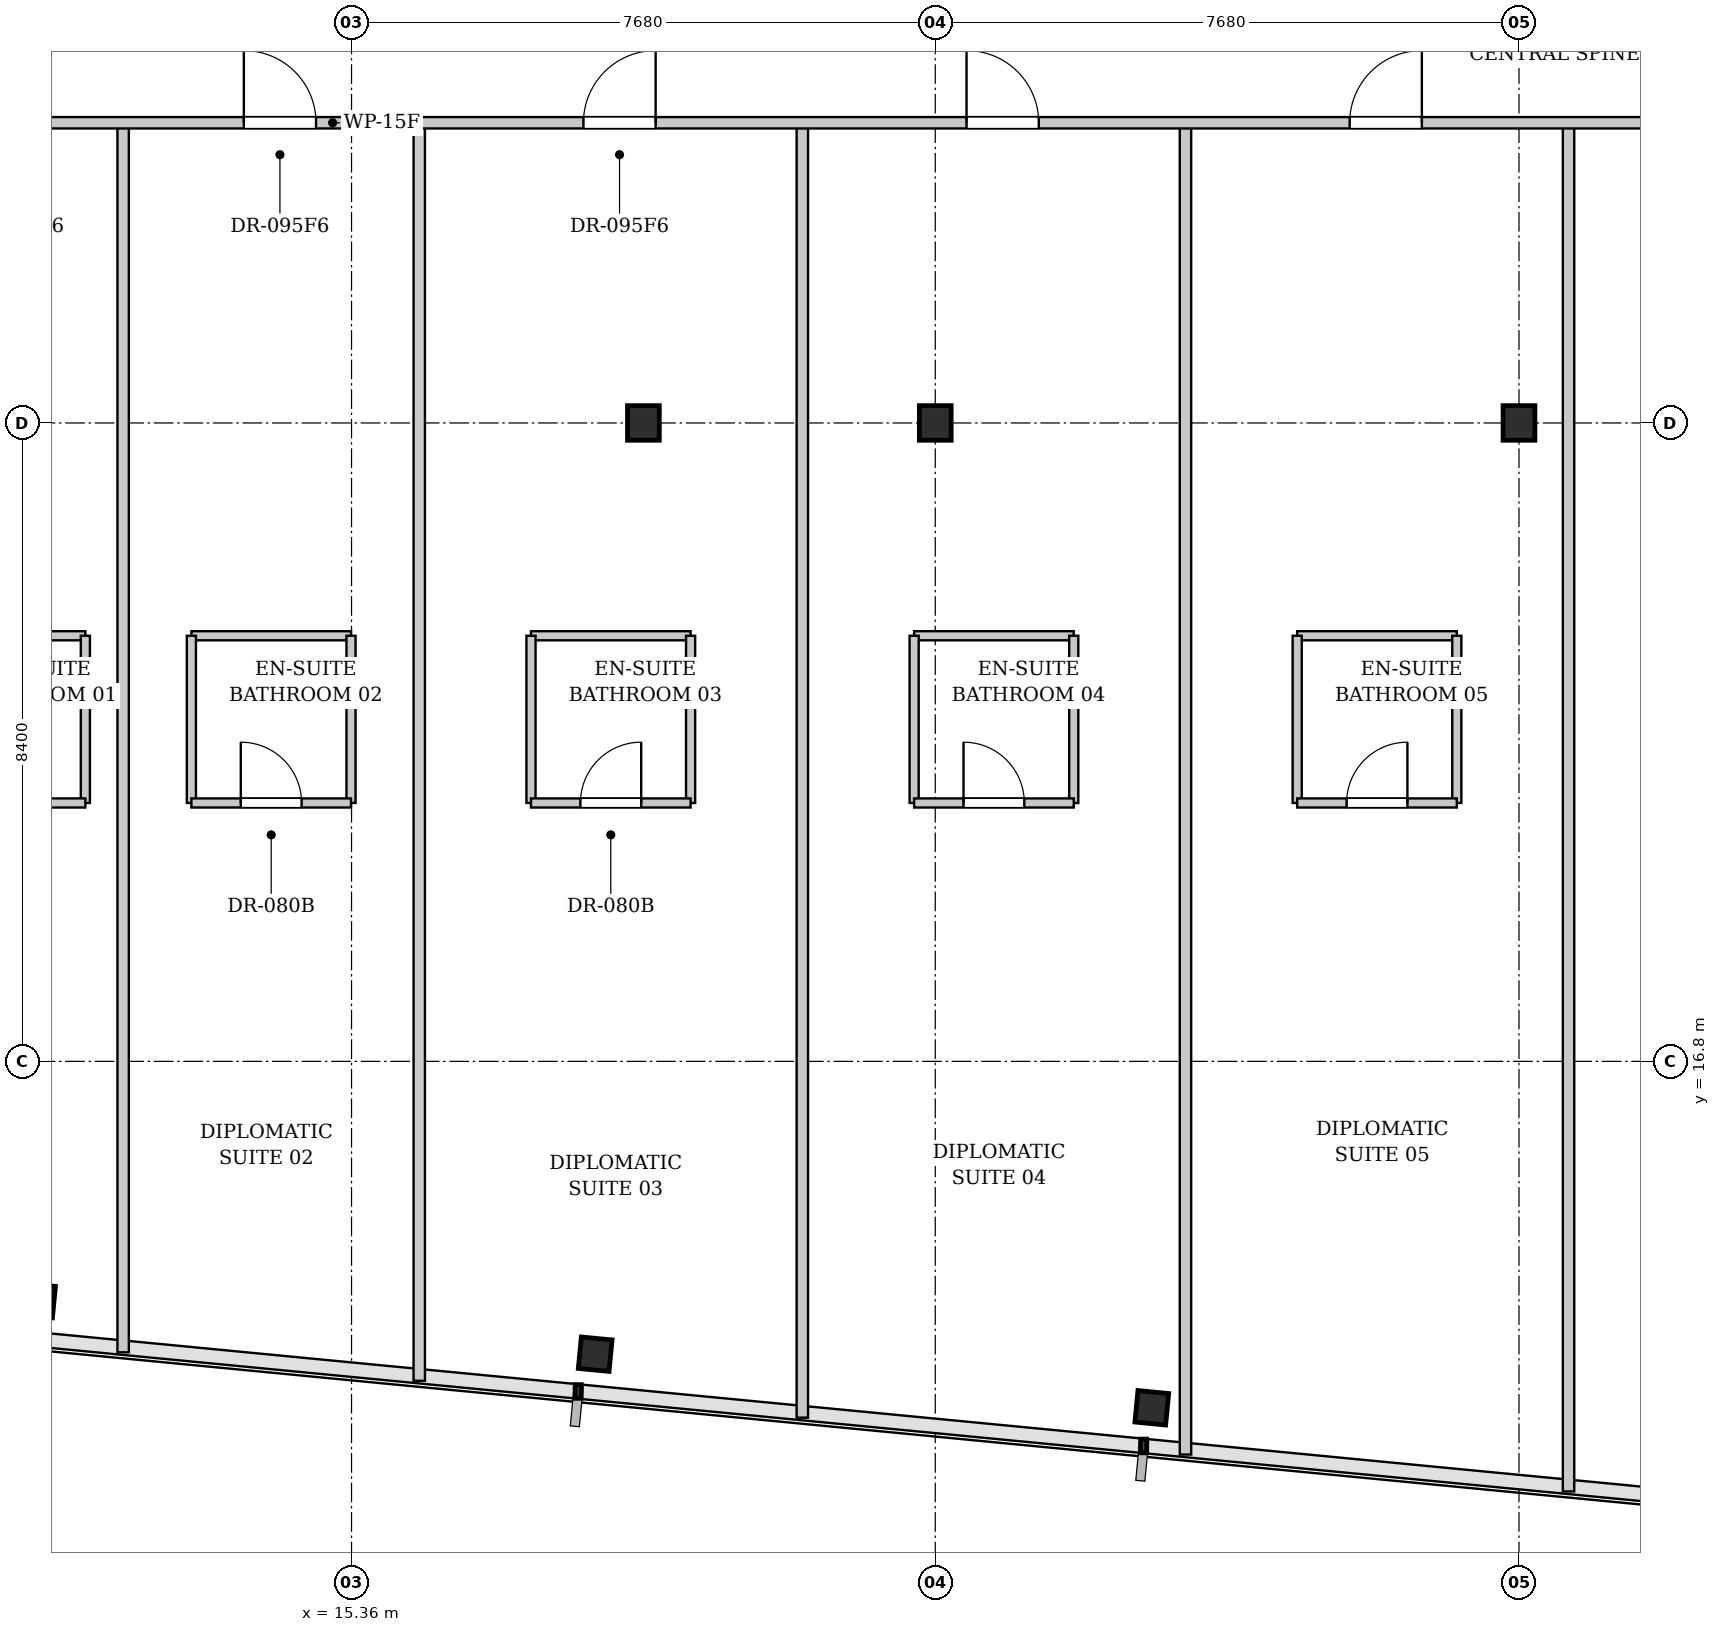
"""IFC4 building model, lengths in metres.
Left out: names, types, materials, properties, quantities, classifications, styles, units other than length and angle.
Written with IfcOpenShell. Run it as: python <this file> out.ifc"""

import sys

from ifc_helpers import new_model, si_unit, direction, frame, frame_2d, origin, origin_2d, place, context, subcontext, project, spatial, rectangle, i_section, extrude, element, fill, save


model = new_model("IFC4")
c1 = context("Model", 3, precision=1e-05, world=origin(), true_north=direction((0.0, 1.0)))
c2 = subcontext(c1, "Body", "Model", "MODEL_VIEW")
j1 = project(units=[si_unit("LENGTHUNIT", "METRE"), si_unit("PLANEANGLEUNIT", "RADIAN")], contexts=[c1])
p1 = place(None, origin())
s1 = spatial("IfcSite", under=j1, at=p1, CompositionType="ELEMENT")
p2 = place(p1, origin())
s2 = spatial("IfcBuilding", under=s1, at=p2, CompositionType="ELEMENT")
p3 = place(p2, frame((0.0, 0.0, 178.7)))
s3 = spatial("IfcBuildingStorey", under=s2, at=p3, CompositionType="ELEMENT", Elevation=178.7)
for number, where, z_axis, x_axis in (
    (1, (23.04, 25.2, 0.0), (0.0, 0.0, 1.0), (1.0, 0.0, 0.0)),
    (2, (30.72, 25.2, 0.0), (0.0, 0.0, 1.0), (1.0, 0.0, 0.0)),
    (3, (19.2, 25.2, 0.0), (0.0, 0.0, 1.0), (1.0, 0.0, 0.0)),
):
    element("IfcColumn", number, at=place(p3, frame(where, z_axis=z_axis, x_axis=x_axis)), inside=s3, PredefinedType="COLUMN", context=c2, shape_type="SweptSolid", body=[
        extrude(i_section(OverallWidth=0.418, OverallDepth=0.455, WebThickness=0.042, FlangeThickness=0.068, FilletRadius=0.015, at=origin_2d()), origin(), (0.0, 0.0, 1.0), 3.3),
    ])
for number, where, z_axis, x_axis in (
    (4, (11.242, 13.652, 0.0), (0.0, 0.0, 1.0), (0.995, -0.096, 0.0)),
    (5, (18.566, 12.947, 0.0), (0.0, 0.0, 1.0), (0.995, -0.096, 0.0)),
    (6, (25.889, 12.242, 0.0), (0.0, 0.0, 1.0), (0.995, -0.096, 0.0)),
):
    element("IfcColumn", number, at=place(p3, frame(where, z_axis=z_axis, x_axis=x_axis)), inside=s3, PredefinedType="COLUMN", context=c2, shape_type="SweptSolid", body=[
        extrude(i_section(OverallWidth=0.406, OverallDepth=0.416, WebThickness=0.03, FlangeThickness=0.048, FilletRadius=0.015, at=origin_2d()), origin(), (0.0, 0.0, 1.0), 3.3),
    ])
p4 = place(p3, frame((9.758, 22.4, 0.0), z_axis=(0.0, 0.0, 1.0), x_axis=(1.0, 0.0, 0.0)))
e7 = element("IfcWall", 7, at=p4, inside=s3, PredefinedType="PARTITIONING", context=c2, shape_type="SweptSolid", body=[
    extrude(rectangle(XDim=2.1, YDim=0.12, at=frame_2d((1.05, 0.0))), origin(), (0.0, 0.0, 1.0), 3.08),
])
p5 = place(p3, frame((11.858, 20.2, 0.0), z_axis=(0.0, 0.0, 1.0), x_axis=(0.0, 1.0, 0.0)))
e8 = element("IfcWall", 8, at=p5, inside=s3, PredefinedType="PARTITIONING", context=c2, shape_type="SweptSolid", body=[
    extrude(rectangle(XDim=2.2, YDim=0.12, at=frame_2d((1.1, 0.0))), origin(), (0.0, 0.0, 1.0), 3.08),
])
p6 = place(p3, frame((9.758, 20.2, 0.0), z_axis=(0.0, 0.0, 1.0), x_axis=(1.0, 0.0, 0.0)))
e9 = element("IfcWall", 9, at=p6, inside=s3, PredefinedType="PARTITIONING", context=c2, shape_type="SweptSolid", body=[
    extrude(rectangle(XDim=2.1, YDim=0.12, at=frame_2d((1.05, 0.0))), origin(), (0.0, 0.0, 1.0), 3.08),
])
p7 = place(p6, frame((0.65, 0.0, 0.0)))
e10 = element("IfcOpeningElement", 10, at=p7, cuts=e9, PredefinedType="OPENING", context=c2, shape_type="SweptSolid", body=[
    extrude(rectangle(XDim=0.8, YDim=2.1, at=frame_2d((0.4, 1.05))), frame((0.0, 0.07, 0.0), z_axis=(0.0, -1.0, 0.0), x_axis=(1.0, 0.0, 0.0)), (0.0, 0.0, 1.0), 0.14),
])
p8 = place(p3, frame((13.253, 22.4, 0.0), z_axis=(0.0, 0.0, 1.0), x_axis=(1.0, 0.0, 0.0)))
e11 = element("IfcWall", 11, at=p8, inside=s3, PredefinedType="PARTITIONING", context=c2, shape_type="SweptSolid", body=[
    extrude(rectangle(XDim=2.1, YDim=0.12, at=frame_2d((1.05, 0.0))), origin(), (0.0, 0.0, 1.0), 3.08),
])
for number, where, z_axis, x_axis in (
    (12, (13.253, 20.2, 0.0), (0.0, 0.0, 1.0), (0.0, 1.0, 0.0)),
    (13, (15.353, 20.2, 0.0), (0.0, 0.0, 1.0), (0.0, 1.0, 0.0)),
):
    element("IfcWall", number, at=place(p3, frame(where, z_axis=z_axis, x_axis=x_axis)), inside=s3, PredefinedType="PARTITIONING", context=c2, shape_type="SweptSolid", body=[
        extrude(rectangle(XDim=2.2, YDim=0.12, at=frame_2d((1.1, 0.0))), origin(), (0.0, 0.0, 1.0), 3.08),
    ])
p9 = place(p3, frame((13.253, 20.2, 0.0), z_axis=(0.0, 0.0, 1.0), x_axis=(1.0, 0.0, 0.0)))
e14 = element("IfcWall", 14, at=p9, inside=s3, PredefinedType="PARTITIONING", context=c2, shape_type="SweptSolid", body=[
    extrude(rectangle(XDim=2.1, YDim=0.12, at=frame_2d((1.05, 0.0))), origin(), (0.0, 0.0, 1.0), 3.08),
])
p10 = place(p9, frame((0.65, 0.0, 0.0)))
e15 = element("IfcOpeningElement", 15, at=p10, cuts=e14, PredefinedType="OPENING", context=c2, shape_type="SweptSolid", body=[
    extrude(rectangle(XDim=0.8, YDim=2.1, at=frame_2d((0.4, 1.05))), frame((0.0, 0.07, 0.0), z_axis=(0.0, -1.0, 0.0), x_axis=(1.0, 0.0, 0.0)), (0.0, 0.0, 1.0), 0.14),
])
p11 = place(p3, frame((12.355, 12.972, 0.0), z_axis=(0.0, 0.0, 1.0), x_axis=(0.0, 1.0, 0.0)))
e16 = element("IfcWall", 16, at=p11, inside=s3, PredefinedType="PARTITIONING", context=c2, shape_type="SweptSolid", body=[
    extrude(rectangle(XDim=16.198, YDim=0.15, at=frame_2d((8.099, 0.0))), origin(), (0.0, 0.0, 1.0), 3.08),
])
p12 = place(p3, frame((17.721, 22.4, 0.0), z_axis=(0.0, 0.0, 1.0), x_axis=(1.0, 0.0, 0.0)))
e17 = element("IfcWall", 17, at=p12, inside=s3, PredefinedType="PARTITIONING", context=c2, shape_type="SweptSolid", body=[
    extrude(rectangle(XDim=2.1, YDim=0.12, at=frame_2d((1.05, 0.0))), origin(), (0.0, 0.0, 1.0), 3.08),
])
for number, where, z_axis, x_axis in (
    (18, (17.721, 20.2, 0.0), (0.0, 0.0, 1.0), (0.0, 1.0, 0.0)),
    (19, (19.821, 20.2, 0.0), (0.0, 0.0, 1.0), (0.0, 1.0, 0.0)),
):
    element("IfcWall", number, at=place(p3, frame(where, z_axis=z_axis, x_axis=x_axis)), inside=s3, PredefinedType="PARTITIONING", context=c2, shape_type="SweptSolid", body=[
        extrude(rectangle(XDim=2.2, YDim=0.12, at=frame_2d((1.1, 0.0))), origin(), (0.0, 0.0, 1.0), 3.08),
    ])
p13 = place(p3, frame((17.721, 20.2, 0.0), z_axis=(0.0, 0.0, 1.0), x_axis=(1.0, 0.0, 0.0)))
e20 = element("IfcWall", 20, at=p13, inside=s3, PredefinedType="PARTITIONING", context=c2, shape_type="SweptSolid", body=[
    extrude(rectangle(XDim=2.1, YDim=0.12, at=frame_2d((1.05, 0.0))), origin(), (0.0, 0.0, 1.0), 3.08),
])
p14 = place(p13, frame((0.65, 0.0, 0.0)))
e21 = element("IfcOpeningElement", 21, at=p14, cuts=e20, PredefinedType="OPENING", context=c2, shape_type="SweptSolid", body=[
    extrude(rectangle(XDim=0.8, YDim=2.1, at=frame_2d((0.4, 1.05))), frame((0.0, 0.07, 0.0), z_axis=(0.0, -1.0, 0.0), x_axis=(1.0, 0.0, 0.0)), (0.0, 0.0, 1.0), 0.14),
])
p15 = place(p3, frame((16.251, 12.597, 0.0), z_axis=(0.0, 0.0, 1.0), x_axis=(0.0, 1.0, 0.0)))
e22 = element("IfcWall", 22, at=p15, inside=s3, PredefinedType="PARTITIONING", context=c2, shape_type="SweptSolid", body=[
    extrude(rectangle(XDim=16.573, YDim=0.15, at=frame_2d((8.286, 0.0))), origin(), (0.0, 0.0, 1.0), 3.08),
])
p16 = place(p3, frame((22.762, 22.4, 0.0), z_axis=(0.0, 0.0, 1.0), x_axis=(1.0, 0.0, 0.0)))
e23 = element("IfcWall", 23, at=p16, inside=s3, PredefinedType="PARTITIONING", context=c2, shape_type="SweptSolid", body=[
    extrude(rectangle(XDim=2.1, YDim=0.12, at=frame_2d((1.05, 0.0))), origin(), (0.0, 0.0, 1.0), 3.08),
])
for number, where, z_axis, x_axis in (
    (24, (22.762, 20.2, 0.0), (0.0, 0.0, 1.0), (0.0, 1.0, 0.0)),
    (25, (24.862, 20.2, 0.0), (0.0, 0.0, 1.0), (0.0, 1.0, 0.0)),
):
    element("IfcWall", number, at=place(p3, frame(where, z_axis=z_axis, x_axis=x_axis)), inside=s3, PredefinedType="PARTITIONING", context=c2, shape_type="SweptSolid", body=[
        extrude(rectangle(XDim=2.2, YDim=0.12, at=frame_2d((1.1, 0.0))), origin(), (0.0, 0.0, 1.0), 3.08),
    ])
p17 = place(p3, frame((22.762, 20.2, 0.0), z_axis=(0.0, 0.0, 1.0), x_axis=(1.0, 0.0, 0.0)))
e26 = element("IfcWall", 26, at=p17, inside=s3, PredefinedType="PARTITIONING", context=c2, shape_type="SweptSolid", body=[
    extrude(rectangle(XDim=2.1, YDim=0.12, at=frame_2d((1.05, 0.0))), origin(), (0.0, 0.0, 1.0), 3.08),
])
p18 = place(p17, frame((0.65, 0.0, 0.0)))
e27 = element("IfcOpeningElement", 27, at=p18, cuts=e26, PredefinedType="OPENING", context=c2, shape_type="SweptSolid", body=[
    extrude(rectangle(XDim=0.8, YDim=2.1, at=frame_2d((0.4, 1.05))), frame((0.0, 0.07, 0.0), z_axis=(0.0, -1.0, 0.0), x_axis=(1.0, 0.0, 0.0)), (0.0, 0.0, 1.0), 0.14),
])
p19 = place(p3, frame((21.291, 12.112, 0.0), z_axis=(0.0, 0.0, 1.0), x_axis=(0.0, 1.0, 0.0)))
e28 = element("IfcWall", 28, at=p19, inside=s3, PredefinedType="PARTITIONING", context=c2, shape_type="SweptSolid", body=[
    extrude(rectangle(XDim=17.058, YDim=0.15, at=frame_2d((8.529, 0.0))), origin(), (0.0, 0.0, 1.0), 3.08),
])
p20 = place(p3, frame((27.802, 22.4, 0.0), z_axis=(0.0, 0.0, 1.0), x_axis=(1.0, 0.0, 0.0)))
e29 = element("IfcWall", 29, at=p20, inside=s3, PredefinedType="PARTITIONING", context=c2, shape_type="SweptSolid", body=[
    extrude(rectangle(XDim=2.1, YDim=0.12, at=frame_2d((1.05, 0.0))), origin(), (0.0, 0.0, 1.0), 3.08),
])
for number, where, z_axis, x_axis in (
    (30, (27.802, 20.2, 0.0), (0.0, 0.0, 1.0), (0.0, 1.0, 0.0)),
    (31, (29.902, 20.2, 0.0), (0.0, 0.0, 1.0), (0.0, 1.0, 0.0)),
):
    element("IfcWall", number, at=place(p3, frame(where, z_axis=z_axis, x_axis=x_axis)), inside=s3, PredefinedType="PARTITIONING", context=c2, shape_type="SweptSolid", body=[
        extrude(rectangle(XDim=2.2, YDim=0.12, at=frame_2d((1.1, 0.0))), origin(), (0.0, 0.0, 1.0), 3.08),
    ])
p21 = place(p3, frame((27.802, 20.2, 0.0), z_axis=(0.0, 0.0, 1.0), x_axis=(1.0, 0.0, 0.0)))
e32 = element("IfcWall", 32, at=p21, inside=s3, PredefinedType="PARTITIONING", context=c2, shape_type="SweptSolid", body=[
    extrude(rectangle(XDim=2.1, YDim=0.12, at=frame_2d((1.05, 0.0))), origin(), (0.0, 0.0, 1.0), 3.08),
])
p22 = place(p21, frame((0.65, 0.0, 0.0)))
e33 = element("IfcOpeningElement", 33, at=p22, cuts=e32, PredefinedType="OPENING", context=c2, shape_type="SweptSolid", body=[
    extrude(rectangle(XDim=0.8, YDim=2.1, at=frame_2d((0.4, 1.05))), frame((0.0, 0.07, 0.0), z_axis=(0.0, -1.0, 0.0), x_axis=(1.0, 0.0, 0.0)), (0.0, 0.0, 1.0), 0.14),
])
p23 = place(p3, frame((26.332, 11.626, 0.0), z_axis=(0.0, 0.0, 1.0), x_axis=(0.0, 1.0, 0.0)))
e34 = element("IfcWall", 34, at=p23, inside=s3, PredefinedType="PARTITIONING", context=c2, shape_type="SweptSolid", body=[
    extrude(rectangle(XDim=17.543, YDim=0.15, at=frame_2d((8.772, 0.0))), origin(), (0.0, 0.0, 1.0), 3.08),
])
p24 = place(p3, frame((31.372, 11.141, 0.0), z_axis=(0.0, 0.0, 1.0), x_axis=(0.0, 1.0, 0.0)))
e35 = element("IfcWall", 35, at=p24, inside=s3, PredefinedType="PARTITIONING", context=c2, shape_type="SweptSolid", body=[
    extrude(rectangle(XDim=18.029, YDim=0.15, at=frame_2d((9.014, 0.0))), origin(), (0.0, 0.0, 1.0), 2.475),
])
p25 = place(p3, frame((2.46, 29.15, 0.0), z_axis=(0.0, 0.0, 1.0), x_axis=(1.0, 0.0, 0.0)))
e36 = element("IfcWall", 36, at=p25, inside=s3, PredefinedType="PARTITIONING", context=c2, shape_type="SweptSolid", body=[
    extrude(rectangle(XDim=57.505, YDim=0.15, at=frame_2d((28.752, 0.0))), origin(), (0.0, 0.0, 1.0), 2.475),
])
p26 = place(p25, frame((7.987, 0.0, 0.0)))
e37 = element("IfcOpeningElement", 37, at=p26, cuts=e36, PredefinedType="OPENING", context=c2, shape_type="SweptSolid", body=[
    extrude(rectangle(XDim=0.95, YDim=2.15, at=frame_2d((0.475, 1.075))), frame((0.0, 0.085, 0.0), z_axis=(0.0, -1.0, 0.0), x_axis=(1.0, 0.0, 0.0)), (0.0, 0.0, 1.0), 0.17),
])
p27 = place(p25, frame((11.483, 0.0, 0.0)))
e38 = element("IfcOpeningElement", 38, at=p27, cuts=e36, PredefinedType="OPENING", context=c2, shape_type="SweptSolid", body=[
    extrude(rectangle(XDim=0.95, YDim=2.15, at=frame_2d((0.475, 1.075))), frame((0.0, 0.085, 0.0), z_axis=(0.0, -1.0, 0.0), x_axis=(1.0, 0.0, 0.0)), (0.0, 0.0, 1.0), 0.17),
])
p28 = place(p25, frame((15.951, 0.0, 0.0)))
e39 = element("IfcOpeningElement", 39, at=p28, cuts=e36, PredefinedType="OPENING", context=c2, shape_type="SweptSolid", body=[
    extrude(rectangle(XDim=0.95, YDim=2.15, at=frame_2d((0.475, 1.075))), frame((0.0, 0.085, 0.0), z_axis=(0.0, -1.0, 0.0), x_axis=(1.0, 0.0, 0.0)), (0.0, 0.0, 1.0), 0.17),
])
p29 = place(p25, frame((20.991, 0.0, 0.0)))
e40 = element("IfcOpeningElement", 40, at=p29, cuts=e36, PredefinedType="OPENING", context=c2, shape_type="SweptSolid", body=[
    extrude(rectangle(XDim=0.95, YDim=2.15, at=frame_2d((0.475, 1.075))), frame((0.0, 0.085, 0.0), z_axis=(0.0, -1.0, 0.0), x_axis=(1.0, 0.0, 0.0)), (0.0, 0.0, 1.0), 0.17),
])
p30 = place(p25, frame((26.032, 0.0, 0.0)))
e41 = element("IfcOpeningElement", 41, at=p30, cuts=e36, PredefinedType="OPENING", context=c2, shape_type="SweptSolid", body=[
    extrude(rectangle(XDim=0.95, YDim=2.15, at=frame_2d((0.475, 1.075))), frame((0.0, 0.085, 0.0), z_axis=(0.0, -1.0, 0.0), x_axis=(1.0, 0.0, 0.0)), (0.0, 0.0, 1.0), 0.17),
])
p31 = place(p25, frame((31.072, 0.0, 0.0)))
e42 = element("IfcOpeningElement", 42, at=p31, cuts=e36, PredefinedType="OPENING", context=c2, shape_type="SweptSolid", body=[
    extrude(rectangle(XDim=0.95, YDim=2.15, at=frame_2d((0.475, 1.075))), frame((0.0, 0.085, 0.0), z_axis=(0.0, -1.0, 0.0), x_axis=(1.0, 0.0, 0.0)), (0.0, 0.0, 1.0), 0.17),
])
p32 = place(p25, frame((36.113, 0.0, 0.0)))
e43 = element("IfcOpeningElement", 43, at=p32, cuts=e36, PredefinedType="OPENING", context=c2, shape_type="SweptSolid", body=[
    extrude(rectangle(XDim=0.95, YDim=2.15, at=frame_2d((0.475, 1.075))), frame((0.0, 0.085, 0.0), z_axis=(0.0, -1.0, 0.0), x_axis=(1.0, 0.0, 0.0)), (0.0, 0.0, 1.0), 0.17),
])
p33 = place(p25, frame((41.154, 0.0, 0.0)))
e44 = element("IfcOpeningElement", 44, at=p33, cuts=e36, PredefinedType="OPENING", context=c2, shape_type="SweptSolid", body=[
    extrude(rectangle(XDim=0.95, YDim=2.15, at=frame_2d((0.475, 1.075))), frame((0.0, 0.085, 0.0), z_axis=(0.0, -1.0, 0.0), x_axis=(1.0, 0.0, 0.0)), (0.0, 0.0, 1.0), 0.17),
])
p34 = place(p25, frame((46.042, 0.0, 0.0)))
e45 = element("IfcOpeningElement", 45, at=p34, cuts=e36, PredefinedType="OPENING", context=c2, shape_type="SweptSolid", body=[
    extrude(rectangle(XDim=0.95, YDim=2.15, at=frame_2d((0.475, 1.075))), frame((0.0, 0.085, 0.0), z_axis=(0.0, -1.0, 0.0), x_axis=(1.0, 0.0, 0.0)), (0.0, 0.0, 1.0), 0.17),
])
p35 = place(p25, frame((50.377, 0.0, 0.0)))
e46 = element("IfcOpeningElement", 46, at=p35, cuts=e36, PredefinedType="OPENING", context=c2, shape_type="SweptSolid", body=[
    extrude(rectangle(XDim=0.95, YDim=2.15, at=frame_2d((0.475, 1.075))), frame((0.0, 0.085, 0.0), z_axis=(0.0, -1.0, 0.0), x_axis=(1.0, 0.0, 0.0)), (0.0, 0.0, 1.0), 0.17),
])
p36 = place(p10, origin())
e47 = element("IfcDoor", 47, at=p36, inside=s3, OperationType="SINGLE_SWING_LEFT", PredefinedType="DOOR", context=c2, shape_type="SweptSolid", body=[
    extrude(rectangle(XDim=0.8, YDim=2.1, at=frame_2d((0.4, 1.05))), frame((0.0, 0.025, 0.0), z_axis=(0.0, -1.0, 0.0), x_axis=(1.0, 0.0, 0.0)), (0.0, 0.0, 1.0), 0.05),
])
fill(e15, e47)
p37 = place(p14, origin())
e48 = element("IfcDoor", 48, at=p37, inside=s3, OperationType="SINGLE_SWING_RIGHT", PredefinedType="DOOR", context=c2, shape_type="SweptSolid", body=[
    extrude(rectangle(XDim=0.8, YDim=2.1, at=frame_2d((0.4, 1.05))), frame((0.0, 0.025, 0.0), z_axis=(0.0, -1.0, 0.0), x_axis=(1.0, 0.0, 0.0)), (0.0, 0.0, 1.0), 0.05),
])
fill(e21, e48)
p38 = place(p18, origin())
e49 = element("IfcDoor", 49, at=p38, inside=s3, OperationType="SINGLE_SWING_LEFT", PredefinedType="DOOR", context=c2, shape_type="SweptSolid", body=[
    extrude(rectangle(XDim=0.8, YDim=2.1, at=frame_2d((0.4, 1.05))), frame((0.0, 0.025, 0.0), z_axis=(0.0, -1.0, 0.0), x_axis=(1.0, 0.0, 0.0)), (0.0, 0.0, 1.0), 0.05),
])
fill(e27, e49)
p39 = place(p22, origin())
e50 = element("IfcDoor", 50, at=p39, inside=s3, OperationType="SINGLE_SWING_RIGHT", PredefinedType="DOOR", context=c2, shape_type="SweptSolid", body=[
    extrude(rectangle(XDim=0.8, YDim=2.1, at=frame_2d((0.4, 1.05))), frame((0.0, 0.025, 0.0), z_axis=(0.0, -1.0, 0.0), x_axis=(1.0, 0.0, 0.0)), (0.0, 0.0, 1.0), 0.05),
])
fill(e33, e50)
p40 = place(p27, origin())
e51 = element("IfcDoor", 51, at=p40, inside=s3, OperationType="SINGLE_SWING_LEFT", PredefinedType="DOOR", context=c2, shape_type="SweptSolid", body=[
    extrude(rectangle(XDim=0.95, YDim=2.15, at=frame_2d((0.475, 1.075))), frame((0.0, 0.025, 0.0), z_axis=(0.0, -1.0, 0.0), x_axis=(1.0, 0.0, 0.0)), (0.0, 0.0, 1.0), 0.05),
])
fill(e38, e51)
p41 = place(p28, origin())
e52 = element("IfcDoor", 52, at=p41, inside=s3, OperationType="SINGLE_SWING_RIGHT", PredefinedType="DOOR", context=c2, shape_type="SweptSolid", body=[
    extrude(rectangle(XDim=0.95, YDim=2.15, at=frame_2d((0.475, 1.075))), frame((0.0, 0.025, 0.0), z_axis=(0.0, -1.0, 0.0), x_axis=(1.0, 0.0, 0.0)), (0.0, 0.0, 1.0), 0.05),
])
fill(e39, e52)
p42 = place(p29, origin())
e53 = element("IfcDoor", 53, at=p42, inside=s3, OperationType="SINGLE_SWING_LEFT", PredefinedType="DOOR", context=c2, shape_type="SweptSolid", body=[
    extrude(rectangle(XDim=0.95, YDim=2.15, at=frame_2d((0.475, 1.075))), frame((0.0, 0.025, 0.0), z_axis=(0.0, -1.0, 0.0), x_axis=(1.0, 0.0, 0.0)), (0.0, 0.0, 1.0), 0.05),
])
fill(e40, e53)
p43 = place(p30, origin())
e54 = element("IfcDoor", 54, at=p43, inside=s3, OperationType="SINGLE_SWING_RIGHT", PredefinedType="DOOR", context=c2, shape_type="SweptSolid", body=[
    extrude(rectangle(XDim=0.95, YDim=2.15, at=frame_2d((0.475, 1.075))), frame((0.0, 0.025, 0.0), z_axis=(0.0, -1.0, 0.0), x_axis=(1.0, 0.0, 0.0)), (0.0, 0.0, 1.0), 0.05),
])
fill(e41, e54)
save(model, sys.argv[1])
